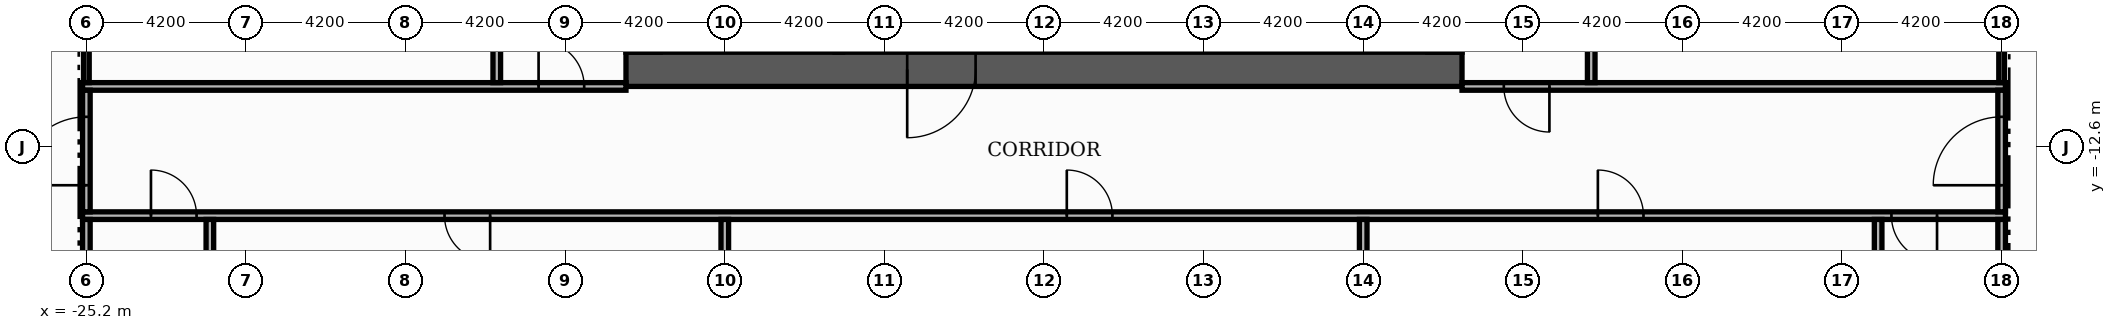
"""IFC4 building model, lengths in metres.
Left out: names, types, materials, properties, quantities, classifications, styles, units other than length and angle.
Written with IfcOpenShell. Run it as: python <this file> out.ifc"""

import sys

from ifc_helpers import new_model, si_unit, direction, frame, frame_2d, origin, place, context, subcontext, project, spatial, rectangle, extrude, element, fill, save


model = new_model("IFC4")
c1 = context("Model", 3, precision=1e-05, world=origin(), true_north=direction((0.0, 1.0)))
c2 = subcontext(c1, "Body", "Model", "MODEL_VIEW")
j1 = project(units=[si_unit("LENGTHUNIT", "METRE"), si_unit("PLANEANGLEUNIT", "RADIAN")], contexts=[c1])
p1 = place(None, origin())
s1 = spatial("IfcSite", under=j1, at=p1, CompositionType="ELEMENT")
p2 = place(p1, origin())
s2 = spatial("IfcBuilding", under=s1, at=p2, CompositionType="ELEMENT")
p3 = place(p2, frame((0.0, 0.0, -4.2)))
s3 = spatial("IfcBuildingStorey", under=s2, at=p3, CompositionType="ELEMENT", Elevation=-4.2)
p4 = place(p3, frame((-11.0, -10.55, 0.0), z_axis=(0.0, 0.0, 1.0), x_axis=(1.0, 0.0, 0.0)))
e1 = element("IfcWall", 1, at=p4, inside=s3, PredefinedType="SHEAR", context=c2, shape_type="SweptSolid", body=[
    extrude(rectangle(XDim=22.0, YDim=0.9, at=frame_2d((11.0, 0.0))), origin(), (0.0, 0.0, 1.0), 3.78),
])
p5 = place(p4, frame((7.4, 0.0, 0.0)))
e2 = element("IfcOpeningElement", 2, at=p5, cuts=e1, PredefinedType="OPENING", context=c2, shape_type="SweptSolid", body=[
    extrude(rectangle(XDim=1.8, YDim=2.2, at=frame_2d((0.9, 1.1))), frame((0.0, 0.46, 0.0), z_axis=(0.0, -1.0, 0.0), x_axis=(1.0, 0.0, 0.0)), (0.0, 0.0, 1.0), 0.92),
])
p6 = place(p3, frame((-25.3, -14.4, 0.0), z_axis=(0.0, 0.0, 1.0), x_axis=(1.0, 0.0, 0.0)))
e3 = element("IfcWall", 3, at=p6, inside=s3, PredefinedType="PARTITIONING", context=c2, shape_type="SweptSolid", body=[
    extrude(rectangle(XDim=50.6, YDim=0.2, at=frame_2d((25.3, 0.0))), origin(), (0.0, 0.0, 1.0), 3.78),
])
p7 = place(p6, frame((1.8, 0.0, 0.0)))
e4 = element("IfcOpeningElement", 4, at=p7, cuts=e3, PredefinedType="OPENING", context=c2, shape_type="SweptSolid", body=[
    extrude(rectangle(XDim=1.2, YDim=2.2, at=frame_2d((0.6, 1.1))), frame((0.0, 0.11, 0.0), z_axis=(0.0, -1.0, 0.0), x_axis=(1.0, 0.0, 0.0)), (0.0, 0.0, 1.0), 0.22),
])
p8 = place(p6, frame((9.525, 0.0, 0.0)))
e5 = element("IfcOpeningElement", 5, at=p8, cuts=e3, PredefinedType="OPENING", context=c2, shape_type="SweptSolid", body=[
    extrude(rectangle(XDim=1.2, YDim=2.2, at=frame_2d((0.6, 1.1))), frame((0.0, 0.11, 0.0), z_axis=(0.0, -1.0, 0.0), x_axis=(1.0, 0.0, 0.0)), (0.0, 0.0, 1.0), 0.22),
])
p9 = place(p6, frame((25.9, 0.0, 0.0)))
e6 = element("IfcOpeningElement", 6, at=p9, cuts=e3, PredefinedType="OPENING", context=c2, shape_type="SweptSolid", body=[
    extrude(rectangle(XDim=1.2, YDim=2.2, at=frame_2d((0.6, 1.1))), frame((0.0, 0.11, 0.0), z_axis=(0.0, -1.0, 0.0), x_axis=(1.0, 0.0, 0.0)), (0.0, 0.0, 1.0), 0.22),
])
p10 = place(p6, frame((39.875, 0.0, 0.0)))
e7 = element("IfcOpeningElement", 7, at=p10, cuts=e3, PredefinedType="OPENING", context=c2, shape_type="SweptSolid", body=[
    extrude(rectangle(XDim=1.2, YDim=2.2, at=frame_2d((0.6, 1.1))), frame((0.0, 0.11, 0.0), z_axis=(0.0, -1.0, 0.0), x_axis=(1.0, 0.0, 0.0)), (0.0, 0.0, 1.0), 0.22),
])
p11 = place(p6, frame((47.6, 0.0, 0.0)))
e8 = element("IfcOpeningElement", 8, at=p11, cuts=e3, PredefinedType="OPENING", context=c2, shape_type="SweptSolid", body=[
    extrude(rectangle(XDim=1.2, YDim=2.2, at=frame_2d((0.6, 1.1))), frame((0.0, 0.11, 0.0), z_axis=(0.0, -1.0, 0.0), x_axis=(1.0, 0.0, 0.0)), (0.0, 0.0, 1.0), 0.22),
])
p12 = place(p3, frame((-25.3, -11.0, 0.0), z_axis=(0.0, 0.0, 1.0), x_axis=(1.0, 0.0, 0.0)))
e9 = element("IfcWall", 9, at=p12, inside=s3, PredefinedType="PARTITIONING", context=c2, shape_type="SweptSolid", body=[
    extrude(rectangle(XDim=14.3, YDim=0.2, at=frame_2d((7.15, 0.0))), origin(), (0.0, 0.0, 1.0), 3.78),
])
p13 = place(p12, frame((12.0, 0.0, 0.0)))
e10 = element("IfcOpeningElement", 10, at=p13, cuts=e9, PredefinedType="OPENING", context=c2, shape_type="SweptSolid", body=[
    extrude(rectangle(XDim=1.2, YDim=2.2, at=frame_2d((0.6, 1.1))), frame((0.0, 0.11, 0.0), z_axis=(0.0, -1.0, 0.0), x_axis=(1.0, 0.0, 0.0)), (0.0, 0.0, 1.0), 0.22),
])
p14 = place(p3, frame((11.0, -11.0, 0.0), z_axis=(0.0, 0.0, 1.0), x_axis=(1.0, 0.0, 0.0)))
e11 = element("IfcWall", 11, at=p14, inside=s3, PredefinedType="PARTITIONING", context=c2, shape_type="SweptSolid", body=[
    extrude(rectangle(XDim=14.3, YDim=0.2, at=frame_2d((7.15, 0.0))), origin(), (0.0, 0.0, 1.0), 3.78),
])
p15 = place(p14, frame((1.1, 0.0, 0.0)))
e12 = element("IfcOpeningElement", 12, at=p15, cuts=e11, PredefinedType="OPENING", context=c2, shape_type="SweptSolid", body=[
    extrude(rectangle(XDim=1.2, YDim=2.2, at=frame_2d((0.6, 1.1))), frame((0.0, 0.11, 0.0), z_axis=(0.0, -1.0, 0.0), x_axis=(1.0, 0.0, 0.0)), (0.0, 0.0, 1.0), 0.22),
])
p16 = place(p3, frame((-25.2, -16.2, 0.0), z_axis=(0.0, 0.0, 1.0), x_axis=(0.0, 1.0, 0.0)))
e13 = element("IfcWall", 13, at=p16, inside=s3, PredefinedType="PARTITIONING", context=c2, shape_type="SweptSolid", body=[
    extrude(rectangle(XDim=1.7, YDim=0.2, at=frame_2d((0.85, 0.0))), origin(), (0.0, 0.0, 1.0), 3.78),
])
p17 = place(p3, frame((-25.2, -14.3, 0.0), z_axis=(0.0, 0.0, 1.0), x_axis=(0.0, 1.0, 0.0)))
e14 = element("IfcWall", 14, at=p17, inside=s3, PredefinedType="PARTITIONING", context=c2, shape_type="SweptSolid", body=[
    extrude(rectangle(XDim=3.2, YDim=0.2, at=frame_2d((1.6, 0.0))), origin(), (0.0, 0.0, 1.0), 3.78),
])
p18 = place(p17, frame((0.7, 0.0, 0.0)))
e15 = element("IfcOpeningElement", 15, at=p18, cuts=e14, PredefinedType="OPENING", context=c2, shape_type="SweptSolid", body=[
    extrude(rectangle(XDim=1.8, YDim=2.2, at=frame_2d((0.9, 1.1))), frame((0.0, 0.11, 0.0), z_axis=(0.0, -1.0, 0.0), x_axis=(1.0, 0.0, 0.0)), (0.0, 0.0, 1.0), 0.22),
])
p19 = place(p3, frame((-25.2, -10.9, 0.0), z_axis=(0.0, 0.0, 1.0), x_axis=(0.0, 1.0, 0.0)))
e16 = element("IfcWall", 16, at=p19, inside=s3, PredefinedType="PARTITIONING", context=c2, shape_type="SweptSolid", body=[
    extrude(rectangle(XDim=1.9, YDim=0.15, at=frame_2d((0.95, 0.0))), origin(), (0.0, 0.0, 1.0), 3.78),
])
p20 = place(p3, frame((-21.95, -18.5, 0.0), z_axis=(0.0, 0.0, 1.0), x_axis=(0.0, 1.0, 0.0)))
e17 = element("IfcWall", 17, at=p20, inside=s3, PredefinedType="PARTITIONING", context=c2, shape_type="SweptSolid", body=[
    extrude(rectangle(XDim=4.0, YDim=0.2, at=frame_2d((2.0, 0.0))), origin(), (0.0, 0.0, 1.0), 3.78),
])
p21 = place(p3, frame((-14.4, -10.9, 0.0), z_axis=(0.0, 0.0, 1.0), x_axis=(0.0, 1.0, 0.0)))
e18 = element("IfcWall", 18, at=p21, inside=s3, PredefinedType="PARTITIONING", context=c2, shape_type="SweptSolid", body=[
    extrude(rectangle(XDim=21.8, YDim=0.2, at=frame_2d((10.9, 0.0))), origin(), (0.0, 0.0, 1.0), 3.78),
])
p22 = place(p21, frame((4.8, 0.0, 0.0)))
e19 = element("IfcOpeningElement", 19, at=p22, cuts=e18, PredefinedType="OPENING", context=c2, shape_type="SweptSolid", body=[
    extrude(rectangle(XDim=1.2, YDim=2.2, at=frame_2d((0.6, 1.1))), frame((0.0, 0.11, 0.0), z_axis=(0.0, -1.0, 0.0), x_axis=(1.0, 0.0, 0.0)), (0.0, 0.0, 1.0), 0.22),
])
p23 = place(p21, frame((15.8, 0.0, 0.0)))
e20 = element("IfcOpeningElement", 20, at=p23, cuts=e18, PredefinedType="OPENING", context=c2, shape_type="SweptSolid", body=[
    extrude(rectangle(XDim=1.2, YDim=2.2, at=frame_2d((0.6, 1.1))), frame((0.0, 0.11, 0.0), z_axis=(0.0, -1.0, 0.0), x_axis=(1.0, 0.0, 0.0)), (0.0, 0.0, 1.0), 0.22),
])
for number, where, z_axis, x_axis in (
    (21, (-8.4, -16.2, 0.0), (0.0, 0.0, 1.0), (0.0, 1.0, 0.0)),
    (22, (8.4, -16.2, 0.0), (0.0, 0.0, 1.0), (0.0, 1.0, 0.0)),
):
    element("IfcWall", number, at=place(p3, frame(where, z_axis=z_axis, x_axis=x_axis)), inside=s3, PredefinedType="PARTITIONING", context=c2, shape_type="SweptSolid", body=[
        extrude(rectangle(XDim=1.7, YDim=0.2, at=frame_2d((0.85, 0.0))), origin(), (0.0, 0.0, 1.0), 3.78),
    ])
p24 = place(p3, frame((14.4, -10.9, 0.0), z_axis=(0.0, 0.0, 1.0), x_axis=(0.0, 1.0, 0.0)))
e23 = element("IfcWall", 23, at=p24, inside=s3, PredefinedType="PARTITIONING", context=c2, shape_type="SweptSolid", body=[
    extrude(rectangle(XDim=21.8, YDim=0.2, at=frame_2d((10.9, 0.0))), origin(), (0.0, 0.0, 1.0), 3.78),
])
p25 = place(p24, frame((4.8, 0.0, 0.0)))
e24 = element("IfcOpeningElement", 24, at=p25, cuts=e23, PredefinedType="OPENING", context=c2, shape_type="SweptSolid", body=[
    extrude(rectangle(XDim=1.2, YDim=2.2, at=frame_2d((0.6, 1.1))), frame((0.0, 0.11, 0.0), z_axis=(0.0, -1.0, 0.0), x_axis=(1.0, 0.0, 0.0)), (0.0, 0.0, 1.0), 0.22),
])
p26 = place(p24, frame((15.8, 0.0, 0.0)))
e25 = element("IfcOpeningElement", 25, at=p26, cuts=e23, PredefinedType="OPENING", context=c2, shape_type="SweptSolid", body=[
    extrude(rectangle(XDim=1.2, YDim=2.2, at=frame_2d((0.6, 1.1))), frame((0.0, 0.11, 0.0), z_axis=(0.0, -1.0, 0.0), x_axis=(1.0, 0.0, 0.0)), (0.0, 0.0, 1.0), 0.22),
])
p27 = place(p3, frame((21.95, -18.5, 0.0), z_axis=(0.0, 0.0, 1.0), x_axis=(0.0, 1.0, 0.0)))
e26 = element("IfcWall", 26, at=p27, inside=s3, PredefinedType="PARTITIONING", context=c2, shape_type="SweptSolid", body=[
    extrude(rectangle(XDim=4.0, YDim=0.2, at=frame_2d((2.0, 0.0))), origin(), (0.0, 0.0, 1.0), 3.78),
])
p28 = place(p3, frame((25.2, -16.2, 0.0), z_axis=(0.0, 0.0, 1.0), x_axis=(0.0, 1.0, 0.0)))
e27 = element("IfcWall", 27, at=p28, inside=s3, PredefinedType="PARTITIONING", context=c2, shape_type="SweptSolid", body=[
    extrude(rectangle(XDim=1.7, YDim=0.2, at=frame_2d((0.85, 0.0))), origin(), (0.0, 0.0, 1.0), 3.78),
])
p29 = place(p3, frame((25.2, -14.3, 0.0), z_axis=(0.0, 0.0, 1.0), x_axis=(0.0, 1.0, 0.0)))
e28 = element("IfcWall", 28, at=p29, inside=s3, PredefinedType="PARTITIONING", context=c2, shape_type="SweptSolid", body=[
    extrude(rectangle(XDim=3.2, YDim=0.2, at=frame_2d((1.6, 0.0))), origin(), (0.0, 0.0, 1.0), 3.78),
])
p30 = place(p29, frame((0.7, 0.0, 0.0)))
e29 = element("IfcOpeningElement", 29, at=p30, cuts=e28, PredefinedType="OPENING", context=c2, shape_type="SweptSolid", body=[
    extrude(rectangle(XDim=1.8, YDim=2.2, at=frame_2d((0.9, 1.1))), frame((0.0, 0.11, 0.0), z_axis=(0.0, -1.0, 0.0), x_axis=(1.0, 0.0, 0.0)), (0.0, 0.0, 1.0), 0.22),
])
p31 = place(p3, frame((25.2, -10.9, 0.0), z_axis=(0.0, 0.0, 1.0), x_axis=(0.0, 1.0, 0.0)))
e30 = element("IfcWall", 30, at=p31, inside=s3, PredefinedType="PARTITIONING", context=c2, shape_type="SweptSolid", body=[
    extrude(rectangle(XDim=1.9, YDim=0.15, at=frame_2d((0.95, 0.0))), origin(), (0.0, 0.0, 1.0), 3.78),
])
p32 = place(p5, frame((1.8, 0.0, 0.0), z_axis=(0.0, 0.0, 1.0), x_axis=(-1.0, 0.0, 0.0)))
e31 = element("IfcDoor", 31, at=p32, inside=s3, OperationType="DOUBLE_DOOR_SINGLE_SWING", PredefinedType="DOOR", context=c2, shape_type="SweptSolid", body=[
    extrude(rectangle(XDim=1.8, YDim=2.2, at=frame_2d((0.9, 1.1))), frame((0.0, 0.025, 0.0), z_axis=(0.0, -1.0, 0.0), x_axis=(1.0, 0.0, 0.0)), (0.0, 0.0, 1.0), 0.05),
])
fill(e2, e31)
p33 = place(p7, origin())
e32 = element("IfcDoor", 32, at=p33, inside=s3, OperationType="SINGLE_SWING_LEFT", PredefinedType="DOOR", context=c2, shape_type="SweptSolid", body=[
    extrude(rectangle(XDim=1.2, YDim=2.2, at=frame_2d((0.6, 1.1))), frame((0.0, 0.025, 0.0), z_axis=(0.0, -1.0, 0.0), x_axis=(1.0, 0.0, 0.0)), (0.0, 0.0, 1.0), 0.05),
])
fill(e4, e32)
p34 = place(p8, origin())
e33 = element("IfcDoor", 33, at=p34, inside=s3, OperationType="SINGLE_SWING_RIGHT", PredefinedType="DOOR", context=c2, shape_type="SweptSolid", body=[
    extrude(rectangle(XDim=1.2, YDim=2.2, at=frame_2d((0.6, 1.1))), frame((0.0, 0.025, 0.0), z_axis=(0.0, -1.0, 0.0), x_axis=(1.0, 0.0, 0.0)), (0.0, 0.0, 1.0), 0.05),
])
fill(e5, e33)
p35 = place(p9, origin())
e34 = element("IfcDoor", 34, at=p35, inside=s3, OperationType="SINGLE_SWING_LEFT", PredefinedType="DOOR", context=c2, shape_type="SweptSolid", body=[
    extrude(rectangle(XDim=1.2, YDim=2.2, at=frame_2d((0.6, 1.1))), frame((0.0, 0.025, 0.0), z_axis=(0.0, -1.0, 0.0), x_axis=(1.0, 0.0, 0.0)), (0.0, 0.0, 1.0), 0.05),
])
fill(e6, e34)
p36 = place(p10, origin())
e35 = element("IfcDoor", 35, at=p36, inside=s3, OperationType="SINGLE_SWING_LEFT", PredefinedType="DOOR", context=c2, shape_type="SweptSolid", body=[
    extrude(rectangle(XDim=1.2, YDim=2.2, at=frame_2d((0.6, 1.1))), frame((0.0, 0.025, 0.0), z_axis=(0.0, -1.0, 0.0), x_axis=(1.0, 0.0, 0.0)), (0.0, 0.0, 1.0), 0.05),
])
fill(e7, e35)
p37 = place(p11, origin())
e36 = element("IfcDoor", 36, at=p37, inside=s3, OperationType="SINGLE_SWING_RIGHT", PredefinedType="DOOR", context=c2, shape_type="SweptSolid", body=[
    extrude(rectangle(XDim=1.2, YDim=2.2, at=frame_2d((0.6, 1.1))), frame((0.0, 0.025, 0.0), z_axis=(0.0, -1.0, 0.0), x_axis=(1.0, 0.0, 0.0)), (0.0, 0.0, 1.0), 0.05),
])
fill(e8, e36)
p38 = place(p18, origin())
e37 = element("IfcDoor", 37, at=p38, inside=s3, OperationType="DOUBLE_DOOR_SINGLE_SWING", PredefinedType="DOOR", context=c2, shape_type="SweptSolid", body=[
    extrude(rectangle(XDim=1.8, YDim=2.2, at=frame_2d((0.9, 1.1))), frame((0.0, 0.025, 0.0), z_axis=(0.0, -1.0, 0.0), x_axis=(1.0, 0.0, 0.0)), (0.0, 0.0, 1.0), 0.05),
])
fill(e15, e37)
p39 = place(p30, origin())
e38 = element("IfcDoor", 38, at=p39, inside=s3, OperationType="DOUBLE_DOOR_SINGLE_SWING", PredefinedType="DOOR", context=c2, shape_type="SweptSolid", body=[
    extrude(rectangle(XDim=1.8, YDim=2.2, at=frame_2d((0.9, 1.1))), frame((0.0, 0.025, 0.0), z_axis=(0.0, -1.0, 0.0), x_axis=(1.0, 0.0, 0.0)), (0.0, 0.0, 1.0), 0.05),
])
fill(e29, e38)
p40 = place(p13, origin())
e39 = element("IfcDoor", 39, at=p40, inside=s3, OperationType="SINGLE_SWING_LEFT", PredefinedType="DOOR", context=c2, shape_type="SweptSolid", body=[
    extrude(rectangle(XDim=1.2, YDim=2.2, at=frame_2d((0.6, 1.1))), frame((0.0, 0.025, 0.0), z_axis=(0.0, -1.0, 0.0), x_axis=(1.0, 0.0, 0.0)), (0.0, 0.0, 1.0), 0.05),
])
fill(e10, e39)
p41 = place(p15, origin())
e40 = element("IfcDoor", 40, at=p41, inside=s3, OperationType="SINGLE_SWING_RIGHT", PredefinedType="DOOR", context=c2, shape_type="SweptSolid", body=[
    extrude(rectangle(XDim=1.2, YDim=2.2, at=frame_2d((0.6, 1.1))), frame((0.0, 0.025, 0.0), z_axis=(0.0, -1.0, 0.0), x_axis=(1.0, 0.0, 0.0)), (0.0, 0.0, 1.0), 0.05),
])
fill(e12, e40)
save(model, sys.argv[1])
